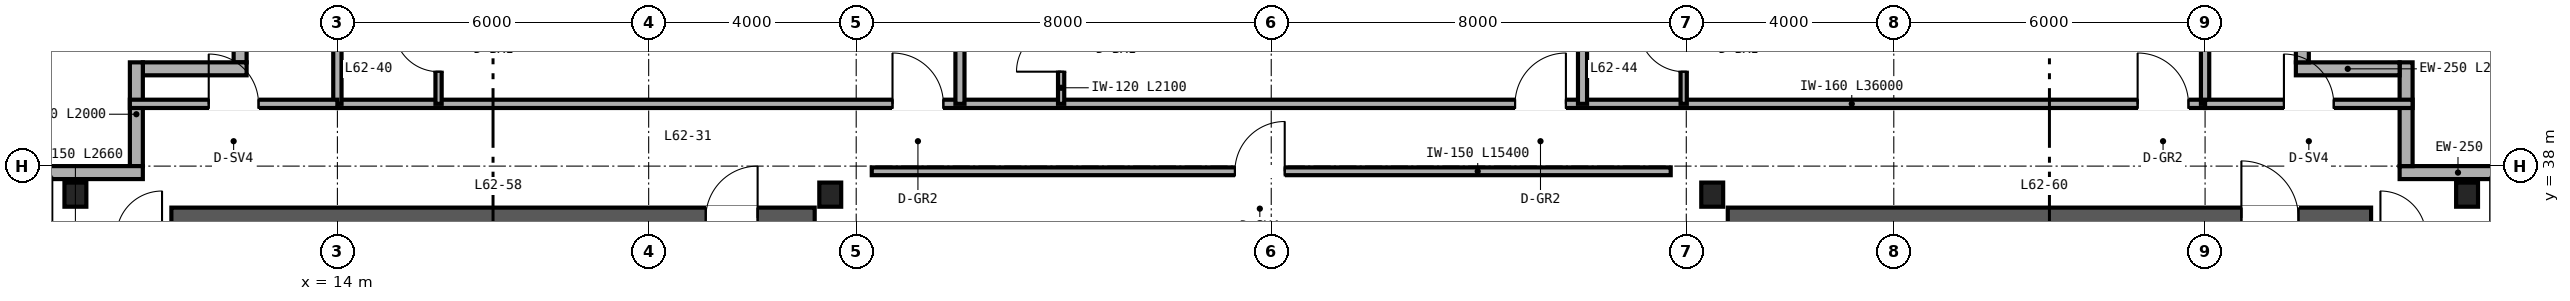
"""IFC4 building model, lengths in metres.
Left out: names, types, materials, properties, quantities, classifications, styles, units other than length and angle.
Written with IfcOpenShell. Run it as: python <this file> out.ifc"""

import sys

from ifc_helpers import new_model, si_unit, direction, frame, frame_2d, origin, origin_2d, place, context, subcontext, project, spatial, rectangle, i_section, extrude, source, transform, mapped, element, fill, save


model = new_model("IFC4")
c1 = context("Model", 3, precision=1e-05, world=origin(), true_north=direction((0.0, 1.0)))
c2 = subcontext(c1, "Body", "Model", "MODEL_VIEW")
j1 = project(units=[si_unit("LENGTHUNIT", "METRE"), si_unit("PLANEANGLEUNIT", "RADIAN")], contexts=[c1])
p1 = place(None, origin())
s1 = spatial("IfcSite", under=j1, at=p1, CompositionType="ELEMENT")
p2 = place(p1, origin())
s2 = spatial("IfcBuilding", under=s1, at=p2, CompositionType="ELEMENT")
p3 = place(p2, frame((0.0, 0.0, 247.2)))
s3 = spatial("IfcBuildingStorey", under=s2, at=p3, CompositionType="ELEMENT", Elevation=247.2)
p4 = place(p3, frame((10.8, 37.0, 0.0), z_axis=(0.0, 0.0, 1.0), x_axis=(1.0, 0.0, 0.0)))
e1 = element("IfcWall", 1, at=p4, inside=s3, PredefinedType="SHEAR", context=c2, shape_type="SweptSolid", body=[
    extrude(rectangle(XDim=12.4, YDim=0.4, at=frame_2d((6.2, 0.0))), origin(), (0.0, 0.0, 1.0), 3.38),
])
p5 = place(p4, frame((10.3, 0.0, 0.0)))
e2 = element("IfcOpeningElement", 2, at=p5, cuts=e1, PredefinedType="OPENING", context=c2, shape_type="SweptSolid", body=[
    extrude(rectangle(XDim=1.0, YDim=2.15, at=frame_2d((0.5, 1.075))), frame((0.0, 0.21, 0.0), z_axis=(0.0, -1.0, 0.0), x_axis=(1.0, 0.0, 0.0)), (0.0, 0.0, 1.0), 0.42),
])
p6 = place(p3, frame((40.8, 37.0, 0.0), z_axis=(0.0, 0.0, 1.0), x_axis=(1.0, 0.0, 0.0)))
e3 = element("IfcWall", 3, at=p6, inside=s3, PredefinedType="SHEAR", context=c2, shape_type="SweptSolid", body=[
    extrude(rectangle(XDim=12.4, YDim=0.4, at=frame_2d((6.2, 0.0))), origin(), (0.0, 0.0, 1.0), 3.38),
])
p7 = place(p6, frame((9.9, 0.0, 0.0)))
e4 = element("IfcOpeningElement", 4, at=p7, cuts=e3, PredefinedType="OPENING", context=c2, shape_type="SweptSolid", body=[
    extrude(rectangle(XDim=1.1, YDim=2.15, at=frame_2d((0.55, 1.075))), frame((0.0, 0.21, 0.0), z_axis=(0.0, -1.0, 0.0), x_axis=(1.0, 0.0, 0.0)), (0.0, 0.0, 1.0), 0.42),
])
m1 = source(origin(), c2, "Body", "SweptSolid", [
    extrude(i_section(OverallWidth=0.422, OverallDepth=0.465, WebThickness=0.045, FlangeThickness=0.073, FilletRadius=0.025, at=origin_2d()), origin(), (0.0, 0.0, 1.0), 3.38),
])
for number, where, z_axis, x_axis in (
    (5, (8.95, 37.45, 0.0), (0.0, 0.0, 1.0), (1.0, 0.0, 0.0)),
    (6, (23.5, 37.45, 0.0), (0.0, 0.0, 1.0), (1.0, 0.0, 0.0)),
    (7, (40.5, 37.45, 0.0), (0.0, 0.0, 1.0), (1.0, 0.0, 0.0)),
    (8, (55.05, 37.45, 0.0), (0.0, 0.0, 1.0), (1.0, 0.0, 0.0)),
):
    element("IfcColumn", number, at=place(p3, frame(where, z_axis=z_axis, x_axis=x_axis)), inside=s3, PredefinedType="COLUMN", context=c2, shape_type="MappedRepresentation", body=[
        mapped(m1, transform((0.0, 0.0, 0.0), scale=1.0)),
    ])
p8 = place(p3, frame((56.0, 37.875, 0.0), z_axis=(0.0, 0.0, 1.0), x_axis=(-1.0, 0.0, 0.0)))
e9 = element("IfcWall", 9, at=p8, inside=s3, PredefinedType="SOLIDWALL", context=c2, shape_type="SweptSolid", body=[
    extrude(rectangle(XDim=2.25, YDim=0.25, at=frame_2d((1.125, 0.0))), origin(), (0.0, 0.0, 1.0), 3.38),
])
for number, where, z_axis, x_axis in (
    (10, (53.875, 38.0, 0.0), (0.0, 0.0, 1.0), (0.0, 1.0, 0.0)),
    (11, (53.75, 39.875, 0.0), (0.0, 0.0, 1.0), (-1.0, 0.0, 0.0)),
    (12, (51.875, 40.0, 0.0), (0.0, 0.0, 1.0), (0.0, 1.0, 0.0)),
):
    element("IfcWall", number, at=place(p3, frame(where, z_axis=z_axis, x_axis=x_axis)), inside=s3, PredefinedType="SOLIDWALL", context=c2, shape_type="SweptSolid", body=[
        extrude(rectangle(XDim=2.0, YDim=0.25, at=frame_2d((1.0, 0.0))), origin(), (0.0, 0.0, 1.0), 3.38),
    ])
p9 = place(p3, frame((12.125, 42.0, 0.0), z_axis=(0.0, 0.0, 1.0), x_axis=(0.0, -1.0, 0.0)))
e13 = element("IfcWall", 13, at=p9, inside=s3, PredefinedType="SOLIDWALL", context=c2, shape_type="SweptSolid", body=[
    extrude(rectangle(XDim=2.0, YDim=0.25, at=frame_2d((1.0, 0.0))), origin(), (0.0, 0.0, 1.0), 3.38),
])
p10 = place(p9, frame((0.5, 0.0, 0.85)))
e14 = element("IfcOpeningElement", 14, at=p10, cuts=e13, PredefinedType="OPENING", context=c2, shape_type="SweptSolid", body=[
    extrude(rectangle(XDim=1.0, YDim=1.9, at=frame_2d((0.5, 0.95))), frame((0.0, 0.135, 0.0), z_axis=(0.0, -1.0, 0.0), x_axis=(1.0, 0.0, 0.0)), (0.0, 0.0, 1.0), 0.27),
])
for number, where, z_axis, x_axis in (
    (15, (12.25, 39.875, 0.0), (0.0, 0.0, 1.0), (-1.0, 0.0, 0.0)),
    (16, (10.125, 40.0, 0.0), (0.0, 0.0, 1.0), (0.0, -1.0, 0.0)),
):
    element("IfcWall", number, at=place(p3, frame(where, z_axis=z_axis, x_axis=x_axis)), inside=s3, PredefinedType="SOLIDWALL", context=c2, shape_type="SweptSolid", body=[
        extrude(rectangle(XDim=2.0, YDim=0.25, at=frame_2d((1.0, 0.0))), origin(), (0.0, 0.0, 1.0), 3.38),
    ])
p11 = place(p3, frame((10.25, 37.875, 0.0), z_axis=(0.0, 0.0, 1.0), x_axis=(-1.0, 0.0, 0.0)))
e17 = element("IfcWall", 17, at=p11, inside=s3, PredefinedType="SOLIDWALL", context=c2, shape_type="SweptSolid", body=[
    extrude(rectangle(XDim=2.25, YDim=0.25, at=frame_2d((1.125, 0.0))), origin(), (0.0, 0.0, 1.0), 3.38),
])
p12 = place(p3, frame((24.3, 37.9, 0.0), z_axis=(0.0, 0.0, 1.0), x_axis=(1.0, 0.0, 0.0)))
e18 = element("IfcWall", 18, at=p12, inside=s3, PredefinedType="PARTITIONING", context=c2, shape_type="SweptSolid", body=[
    extrude(rectangle(XDim=15.4, YDim=0.15, at=frame_2d((7.7, 0.0))), origin(), (0.0, 0.0, 1.0), 3.38),
])
p13 = place(p12, frame((7.0, 0.0, 0.0)))
e19 = element("IfcOpeningElement", 19, at=p13, cuts=e18, PredefinedType="OPENING", context=c2, shape_type="SweptSolid", body=[
    extrude(rectangle(XDim=0.96, YDim=2.15, at=frame_2d((0.48, 1.075))), frame((0.0, 0.085, 0.0), z_axis=(0.0, -1.0, 0.0), x_axis=(1.0, 0.0, 0.0)), (0.0, 0.0, 1.0), 0.17),
])
p14 = place(p3, frame((14.0, 39.2, 0.0), z_axis=(0.0, 0.0, 1.0), x_axis=(1.0, 0.0, 0.0)))
e20 = element("IfcWall", 20, at=p14, inside=s3, PredefinedType="PARTITIONING", context=c2, shape_type="SweptSolid", body=[
    extrude(rectangle(XDim=36.0, YDim=0.16, at=frame_2d((18.0, 0.0))), origin(), (0.0, 0.0, 1.0), 2.923),
])
p15 = place(p14, frame((10.7, 0.0, 0.0)))
e21 = element("IfcOpeningElement", 21, at=p15, cuts=e20, PredefinedType="OPENING", context=c2, shape_type="SweptSolid", body=[
    extrude(rectangle(XDim=0.98, YDim=2.2, at=frame_2d((0.49, 1.1))), frame((0.0, 0.09, 0.0), z_axis=(0.0, -1.0, 0.0), x_axis=(1.0, 0.0, 0.0)), (0.0, 0.0, 1.0), 0.18),
])
p16 = place(p14, frame((22.7, 0.0, 0.0)))
e22 = element("IfcOpeningElement", 22, at=p16, cuts=e20, PredefinedType="OPENING", context=c2, shape_type="SweptSolid", body=[
    extrude(rectangle(XDim=0.98, YDim=2.2, at=frame_2d((0.49, 1.1))), frame((0.0, 0.09, 0.0), z_axis=(0.0, -1.0, 0.0), x_axis=(1.0, 0.0, 0.0)), (0.0, 0.0, 1.0), 0.18),
])
p17 = place(p14, frame((34.7, 0.0, 0.0)))
e23 = element("IfcOpeningElement", 23, at=p17, cuts=e20, PredefinedType="OPENING", context=c2, shape_type="SweptSolid", body=[
    extrude(rectangle(XDim=0.98, YDim=2.2, at=frame_2d((0.49, 1.1))), frame((0.0, 0.09, 0.0), z_axis=(0.0, -1.0, 0.0), x_axis=(1.0, 0.0, 0.0)), (0.0, 0.0, 1.0), 0.18),
])
for number, where, z_axis, x_axis in (
    (24, (14.0, 39.2, 0.0), (0.0, 0.0, 1.0), (0.0, 1.0, 0.0)),
    (25, (50.0, 39.2, 0.0), (0.0, 0.0, 1.0), (0.0, 1.0, 0.0)),
):
    element("IfcWall", number, at=place(p3, frame(where, z_axis=z_axis, x_axis=x_axis)), inside=s3, PredefinedType="PARTITIONING", context=c2, shape_type="SweptSolid", body=[
        extrude(rectangle(XDim=4.44, YDim=0.16, at=frame_2d((2.22, 0.0))), origin(), (0.0, 0.0, 1.0), 2.687),
    ])
p18 = place(p3, frame((26.0, 39.2, 0.0), z_axis=(0.0, 0.0, 1.0), x_axis=(0.0, 1.0, 0.0)))
e26 = element("IfcWall", 26, at=p18, inside=s3, PredefinedType="PARTITIONING", context=c2, shape_type="SweptSolid", body=[
    extrude(rectangle(XDim=4.44, YDim=0.175, at=frame_2d((2.22, 0.0))), origin(), (0.0, 0.0, 1.0), 2.432),
])
p19 = place(p3, frame((15.95, 39.2, 0.0), z_axis=(0.0, 0.0, 1.0), x_axis=(0.0, 1.0, 0.0)))
e27 = element("IfcWall", 27, at=p19, inside=s3, PredefinedType="PARTITIONING", context=c2, shape_type="SweptSolid", body=[
    extrude(rectangle(XDim=2.1, YDim=0.12, at=frame_2d((1.05, 0.0))), origin(), (0.0, 0.0, 1.0), 3.38),
])
p20 = place(p19, frame((0.62, 0.0, 0.0)))
e28 = element("IfcOpeningElement", 28, at=p20, cuts=e27, PredefinedType="OPENING", context=c2, shape_type="SweptSolid", body=[
    extrude(rectangle(XDim=0.86, YDim=2.1, at=frame_2d((0.43, 1.05))), frame((0.0, 0.07, 0.0), z_axis=(0.0, -1.0, 0.0), x_axis=(1.0, 0.0, 0.0)), (0.0, 0.0, 1.0), 0.14),
])
p21 = place(p3, frame((38.0, 39.2, 0.0), z_axis=(0.0, 0.0, 1.0), x_axis=(0.0, 1.0, 0.0)))
e29 = element("IfcWall", 29, at=p21, inside=s3, PredefinedType="PARTITIONING", context=c2, shape_type="SweptSolid", body=[
    extrude(rectangle(XDim=4.44, YDim=0.175, at=frame_2d((2.22, 0.0))), origin(), (0.0, 0.0, 1.0), 2.432),
])
p22 = place(p3, frame((27.95, 39.2, 0.0), z_axis=(0.0, 0.0, 1.0), x_axis=(0.0, 1.0, 0.0)))
e30 = element("IfcWall", 30, at=p22, inside=s3, PredefinedType="PARTITIONING", context=c2, shape_type="SweptSolid", body=[
    extrude(rectangle(XDim=2.1, YDim=0.12, at=frame_2d((1.05, 0.0))), origin(), (0.0, 0.0, 1.0), 3.38),
])
p23 = place(p22, frame((0.62, 0.0, 0.0)))
e31 = element("IfcOpeningElement", 31, at=p23, cuts=e30, PredefinedType="OPENING", context=c2, shape_type="SweptSolid", body=[
    extrude(rectangle(XDim=0.86, YDim=2.1, at=frame_2d((0.43, 1.05))), frame((0.0, 0.07, 0.0), z_axis=(0.0, -1.0, 0.0), x_axis=(1.0, 0.0, 0.0)), (0.0, 0.0, 1.0), 0.14),
])
p24 = place(p3, frame((39.95, 39.2, 0.0), z_axis=(0.0, 0.0, 1.0), x_axis=(0.0, 1.0, 0.0)))
e32 = element("IfcWall", 32, at=p24, inside=s3, PredefinedType="PARTITIONING", context=c2, shape_type="SweptSolid", body=[
    extrude(rectangle(XDim=2.1, YDim=0.12, at=frame_2d((1.05, 0.0))), origin(), (0.0, 0.0, 1.0), 3.38),
])
p25 = place(p24, frame((0.62, 0.0, 0.0)))
e33 = element("IfcOpeningElement", 33, at=p25, cuts=e32, PredefinedType="OPENING", context=c2, shape_type="SweptSolid", body=[
    extrude(rectangle(XDim=0.86, YDim=2.1, at=frame_2d((0.43, 1.05))), frame((0.0, 0.07, 0.0), z_axis=(0.0, -1.0, 0.0), x_axis=(1.0, 0.0, 0.0)), (0.0, 0.0, 1.0), 0.14),
])
p26 = place(p3, frame((10.0, 39.2, 0.0), z_axis=(0.0, 0.0, 1.0), x_axis=(1.0, 0.0, 0.0)))
e34 = element("IfcWall", 34, at=p26, inside=s3, PredefinedType="PARTITIONING", context=c2, shape_type="SweptSolid", body=[
    extrude(rectangle(XDim=4.0, YDim=0.16, at=frame_2d((2.0, 0.0))), origin(), (0.0, 0.0, 1.0), 3.38),
])
p27 = place(p26, frame((1.52, 0.0, 0.0)))
e35 = element("IfcOpeningElement", 35, at=p27, cuts=e34, PredefinedType="OPENING", context=c2, shape_type="SweptSolid", body=[
    extrude(rectangle(XDim=0.96, YDim=2.15, at=frame_2d((0.48, 1.075))), frame((0.0, 0.09, 0.0), z_axis=(0.0, -1.0, 0.0), x_axis=(1.0, 0.0, 0.0)), (0.0, 0.0, 1.0), 0.18),
])
p28 = place(p3, frame((50.0, 39.2, 0.0), z_axis=(0.0, 0.0, 1.0), x_axis=(1.0, 0.0, 0.0)))
e36 = element("IfcWall", 36, at=p28, inside=s3, PredefinedType="PARTITIONING", context=c2, shape_type="SweptSolid", body=[
    extrude(rectangle(XDim=4.0, YDim=0.16, at=frame_2d((2.0, 0.0))), origin(), (0.0, 0.0, 1.0), 3.38),
])
p29 = place(p28, frame((1.52, 0.0, 0.0)))
e37 = element("IfcOpeningElement", 37, at=p29, cuts=e36, PredefinedType="OPENING", context=c2, shape_type="SweptSolid", body=[
    extrude(rectangle(XDim=0.96, YDim=2.15, at=frame_2d((0.48, 1.075))), frame((0.0, 0.09, 0.0), z_axis=(0.0, -1.0, 0.0), x_axis=(1.0, 0.0, 0.0)), (0.0, 0.0, 1.0), 0.18),
])
m2 = source(origin(), c2, "Body", "SweptSolid", [
    extrude(rectangle(XDim=1.0, YDim=2.15, at=frame_2d((0.5, 1.075))), frame((0.0, 0.025, 0.0), z_axis=(0.0, -1.0, 0.0), x_axis=(1.0, 0.0, 0.0)), (0.0, 0.0, 1.0), 0.05),
])
p30 = place(p5, origin())
e38 = element("IfcDoor", 38, at=p30, inside=s3, OperationType="SINGLE_SWING_RIGHT", PredefinedType="DOOR", context=c2, shape_type="MappedRepresentation", body=[
    mapped(m2, transform((0.0, 0.0, 0.0), scale=1.0)),
])
fill(e2, e38)
m3 = source(origin(), c2, "Body", "SweptSolid", [
    extrude(rectangle(XDim=1.1, YDim=2.15, at=frame_2d((0.55, 1.075))), frame((0.0, 0.025, 0.0), z_axis=(0.0, -1.0, 0.0), x_axis=(1.0, 0.0, 0.0)), (0.0, 0.0, 1.0), 0.05),
])
p31 = place(p7, origin())
e39 = element("IfcDoor", 39, at=p31, inside=s3, OperationType="SINGLE_SWING_LEFT", PredefinedType="DOOR", context=c2, shape_type="MappedRepresentation", body=[
    mapped(m3, transform((0.0, 0.0, 0.0), scale=1.0)),
])
fill(e4, e39)
m4 = source(origin(), c2, "Body", "SweptSolid", [
    extrude(rectangle(XDim=0.96, YDim=2.15, at=frame_2d((0.48, 1.075))), frame((0.0, 0.025, 0.0), z_axis=(0.0, -1.0, 0.0), x_axis=(1.0, 0.0, 0.0)), (0.0, 0.0, 1.0), 0.05),
])
p32 = place(p13, origin())
e40 = element("IfcDoor", 40, at=p32, inside=s3, OperationType="SINGLE_SWING_RIGHT", PredefinedType="DOOR", context=c2, shape_type="MappedRepresentation", body=[
    mapped(m4, transform((0.0, 0.0, 0.0), scale=1.0)),
])
fill(e19, e40)
m5 = source(origin(), c2, "Body", "SweptSolid", [
    extrude(rectangle(XDim=0.86, YDim=2.1, at=frame_2d((0.43, 1.05))), frame((0.0, 0.025, 0.0), z_axis=(0.0, -1.0, 0.0), x_axis=(1.0, 0.0, 0.0)), (0.0, 0.0, 1.0), 0.05),
])
p33 = place(p20, origin())
e41 = element("IfcDoor", 41, at=p33, inside=s3, OperationType="SINGLE_SWING_RIGHT", PredefinedType="DOOR", context=c2, shape_type="MappedRepresentation", body=[
    mapped(m5, transform((0.0, 0.0, 0.0), scale=1.0)),
])
fill(e28, e41)
p34 = place(p23, origin())
e42 = element("IfcDoor", 42, at=p34, inside=s3, OperationType="SINGLE_SWING_LEFT", PredefinedType="DOOR", context=c2, shape_type="MappedRepresentation", body=[
    mapped(m5, transform((0.0, 0.0, 0.0), scale=1.0)),
])
fill(e31, e42)
p35 = place(p25, origin())
e43 = element("IfcDoor", 43, at=p35, inside=s3, OperationType="SINGLE_SWING_RIGHT", PredefinedType="DOOR", context=c2, shape_type="MappedRepresentation", body=[
    mapped(m5, transform((0.0, 0.0, 0.0), scale=1.0)),
])
fill(e33, e43)
m6 = source(origin(), c2, "Body", "SweptSolid", [
    extrude(rectangle(XDim=0.98, YDim=2.2, at=frame_2d((0.49, 1.1))), frame((0.0, 0.025, 0.0), z_axis=(0.0, -1.0, 0.0), x_axis=(1.0, 0.0, 0.0)), (0.0, 0.0, 1.0), 0.05),
])
p36 = place(p15, origin())
e44 = element("IfcDoor", 44, at=p36, inside=s3, OperationType="SINGLE_SWING_LEFT", PredefinedType="DOOR", context=c2, shape_type="MappedRepresentation", body=[
    mapped(m6, transform((0.0, 0.0, 0.0), scale=1.0)),
])
fill(e21, e44)
p37 = place(p16, origin())
e45 = element("IfcDoor", 45, at=p37, inside=s3, OperationType="SINGLE_SWING_RIGHT", PredefinedType="DOOR", context=c2, shape_type="MappedRepresentation", body=[
    mapped(m6, transform((0.0, 0.0, 0.0), scale=1.0)),
])
fill(e22, e45)
p38 = place(p17, origin())
e46 = element("IfcDoor", 46, at=p38, inside=s3, OperationType="SINGLE_SWING_LEFT", PredefinedType="DOOR", context=c2, shape_type="MappedRepresentation", body=[
    mapped(m6, transform((0.0, 0.0, 0.0), scale=1.0)),
])
fill(e23, e46)
p39 = place(p27, origin())
e47 = element("IfcDoor", 47, at=p39, inside=s3, OperationType="SINGLE_SWING_LEFT", PredefinedType="DOOR", context=c2, shape_type="MappedRepresentation", body=[
    mapped(m4, transform((0.0, 0.0, 0.0), scale=1.0)),
])
fill(e35, e47)
p40 = place(p29, origin())
e48 = element("IfcDoor", 48, at=p40, inside=s3, OperationType="SINGLE_SWING_LEFT", PredefinedType="DOOR", context=c2, shape_type="MappedRepresentation", body=[
    mapped(m4, transform((0.0, 0.0, 0.0), scale=1.0)),
])
fill(e37, e48)
save(model, sys.argv[1])
